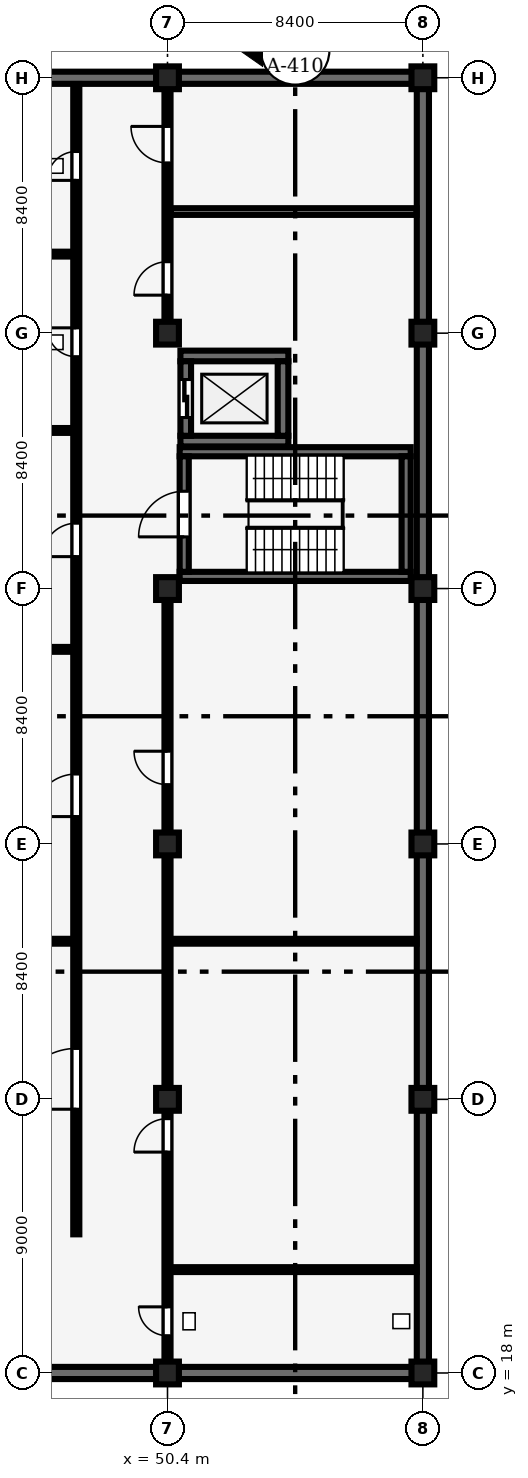
"""IFC4 building model, lengths in metres.
Left out: names, types, materials, properties, quantities, classifications, styles, units other than length and angle.
Written with IfcOpenShell. Run it as: python <this file> out.ifc"""

import sys

from ifc_helpers import new_model, si_unit, direction, frame, frame_2d, origin, origin_2d, place, context, subcontext, project, spatial, rectangle, extrude, element, fill, save


model = new_model("IFC4")
c1 = context("Model", 3, precision=1e-05, world=origin(), true_north=direction((0.0, 1.0)))
c2 = subcontext(c1, "Body", "Model", "MODEL_VIEW")
j1 = project(units=[si_unit("LENGTHUNIT", "METRE"), si_unit("PLANEANGLEUNIT", "RADIAN")], contexts=[c1])
p1 = place(None, origin())
s1 = spatial("IfcSite", under=j1, at=p1, CompositionType="ELEMENT")
p2 = place(p1, origin())
s2 = spatial("IfcBuilding", under=s1, at=p2, CompositionType="ELEMENT")
p3 = place(p2, frame((0.0, 0.0, -4.2)))
s3 = spatial("IfcBuildingStorey", under=s2, at=p3, CompositionType="ELEMENT", Elevation=-4.2)
for number, where, z_axis, x_axis in (
    (1, (50.4, 18.0, 0.0), (0.0, 0.0, 1.0), (1.0, 0.0, 0.0)),
    (2, (50.4, 27.0, 0.0), (0.0, 0.0, 1.0), (1.0, 0.0, 0.0)),
    (3, (50.4, 35.4, 0.0), (0.0, 0.0, 1.0), (1.0, 0.0, 0.0)),
    (4, (50.4, 43.8, 0.0), (0.0, 0.0, 1.0), (1.0, 0.0, 0.0)),
    (5, (50.4, 52.2, 0.0), (0.0, 0.0, 1.0), (1.0, 0.0, 0.0)),
    (6, (50.4, 60.6, 0.0), (0.0, 0.0, 1.0), (1.0, 0.0, 0.0)),
    (7, (58.8, 18.0, 0.0), (0.0, 0.0, 1.0), (1.0, 0.0, 0.0)),
    (8, (58.8, 27.0, 0.0), (0.0, 0.0, 1.0), (1.0, 0.0, 0.0)),
    (9, (58.8, 35.4, 0.0), (0.0, 0.0, 1.0), (1.0, 0.0, 0.0)),
    (10, (58.8, 43.8, 0.0), (0.0, 0.0, 1.0), (1.0, 0.0, 0.0)),
    (11, (58.8, 52.2, 0.0), (0.0, 0.0, 1.0), (1.0, 0.0, 0.0)),
    (12, (58.8, 60.6, 0.0), (0.0, 0.0, 1.0), (1.0, 0.0, 0.0)),
):
    element("IfcColumn", number, at=place(p3, frame(where, z_axis=z_axis, x_axis=x_axis)), inside=s3, PredefinedType="COLUMN", context=c2, shape_type="SweptSolid", body=[
        extrude(rectangle(XDim=0.75, YDim=0.75, at=origin_2d()), origin(), (0.0, 0.0, 1.0), 4.2),
    ])
p4 = place(p3, frame((42.35, 18.0, 0.0), z_axis=(0.0, 0.0, 1.0), x_axis=(1.0, 0.0, 0.0)))
e13 = element("IfcWall", 13, at=p4, inside=s3, PredefinedType="SHEAR", context=c2, shape_type="SweptSolid", body=[
    extrude(rectangle(XDim=7.7, YDim=0.4, at=frame_2d((3.85, 0.0))), origin(), (0.0, 0.0, 1.0), 2.95),
])
p5 = place(p3, frame((50.75, 18.0, 0.0), z_axis=(0.0, 0.0, 1.0), x_axis=(1.0, 0.0, 0.0)))
e14 = element("IfcWall", 14, at=p5, inside=s3, PredefinedType="SHEAR", context=c2, shape_type="SweptSolid", body=[
    extrude(rectangle(XDim=7.7, YDim=0.4, at=frame_2d((3.85, 0.0))), origin(), (0.0, 0.0, 1.0), 2.9),
])
p6 = place(p3, frame((58.8, 18.35, 0.0), z_axis=(0.0, 0.0, 1.0), x_axis=(0.0, 1.0, 0.0)))
e15 = element("IfcWall", 15, at=p6, inside=s3, PredefinedType="SHEAR", context=c2, shape_type="SweptSolid", body=[
    extrude(rectangle(XDim=8.3, YDim=0.4, at=frame_2d((4.15, 0.0))), origin(), (0.0, 0.0, 1.0), 3.05),
])
for number, where, z_axis, x_axis in (
    (16, (58.8, 27.35, 0.0), (0.0, 0.0, 1.0), (0.0, 1.0, 0.0)),
    (17, (58.8, 35.75, 0.0), (0.0, 0.0, 1.0), (0.0, 1.0, 0.0)),
):
    element("IfcWall", number, at=place(p3, frame(where, z_axis=z_axis, x_axis=x_axis)), inside=s3, PredefinedType="SHEAR", context=c2, shape_type="SweptSolid", body=[
        extrude(rectangle(XDim=7.7, YDim=0.4, at=frame_2d((3.85, 0.0))), origin(), (0.0, 0.0, 1.0), 3.0),
    ])
p7 = place(p3, frame((58.8, 44.15, 0.0), z_axis=(0.0, 0.0, 1.0), x_axis=(0.0, 1.0, 0.0)))
e18 = element("IfcWall", 18, at=p7, inside=s3, PredefinedType="SHEAR", context=c2, shape_type="SweptSolid", body=[
    extrude(rectangle(XDim=7.7, YDim=0.4, at=frame_2d((3.85, 0.0))), origin(), (0.0, 0.0, 1.0), 2.95),
])
p8 = place(p3, frame((58.8, 52.55, 0.0), z_axis=(0.0, 0.0, 1.0), x_axis=(0.0, 1.0, 0.0)))
e19 = element("IfcWall", 19, at=p8, inside=s3, PredefinedType="SHEAR", context=c2, shape_type="SweptSolid", body=[
    extrude(rectangle(XDim=7.7, YDim=0.4, at=frame_2d((3.85, 0.0))), origin(), (0.0, 0.0, 1.0), 2.9),
])
p9 = place(p3, frame((42.35, 60.6, 0.0), z_axis=(0.0, 0.0, 1.0), x_axis=(1.0, 0.0, 0.0)))
e20 = element("IfcWall", 20, at=p9, inside=s3, PredefinedType="SHEAR", context=c2, shape_type="SweptSolid", body=[
    extrude(rectangle(XDim=7.7, YDim=0.4, at=frame_2d((3.85, 0.0))), origin(), (0.0, 0.0, 1.0), 3.15),
])
p10 = place(p3, frame((50.75, 60.6, 0.0), z_axis=(0.0, 0.0, 1.0), x_axis=(1.0, 0.0, 0.0)))
e21 = element("IfcWall", 21, at=p10, inside=s3, PredefinedType="SHEAR", context=c2, shape_type="SweptSolid", body=[
    extrude(rectangle(XDim=7.7, YDim=0.4, at=frame_2d((3.85, 0.0))), origin(), (0.0, 0.0, 1.0), 3.1),
])
for number, where, z_axis, x_axis in (
    (22, (50.8, 44.2, 0.0), (0.0, 0.0, 1.0), (1.0, 0.0, 0.0)),
    (23, (50.8, 48.3, 0.0), (0.0, 0.0, 1.0), (1.0, 0.0, 0.0)),
):
    element("IfcWall", number, at=place(p3, frame(where, z_axis=z_axis, x_axis=x_axis)), inside=s3, PredefinedType="SHEAR", context=c2, shape_type="SweptSolid", body=[
        extrude(rectangle(XDim=7.6, YDim=0.3, at=frame_2d((3.8, 0.0))), origin(), (0.0, 0.0, 1.0), 4.025),
    ])
p11 = place(p3, frame((50.95, 44.35, 0.0), z_axis=(0.0, 0.0, 1.0), x_axis=(0.0, 1.0, 0.0)))
e24 = element("IfcWall", 24, at=p11, inside=s3, PredefinedType="SHEAR", context=c2, shape_type="SweptSolid", body=[
    extrude(rectangle(XDim=3.8, YDim=0.3, at=frame_2d((1.9, 0.0))), origin(), (0.0, 0.0, 1.0), 4.025),
])
p12 = place(p11, frame((1.15, 0.0, 0.0)))
e25 = element("IfcOpeningElement", 25, at=p12, cuts=e24, PredefinedType="OPENING", context=c2, shape_type="SweptSolid", body=[
    extrude(rectangle(XDim=1.5, YDim=2.2, at=frame_2d((0.75, 1.1))), frame((0.0, 0.16, 0.0), z_axis=(0.0, -1.0, 0.0), x_axis=(1.0, 0.0, 0.0)), (0.0, 0.0, 1.0), 0.32),
])
p13 = place(p3, frame((58.25, 44.35, 0.0), z_axis=(0.0, 0.0, 1.0), x_axis=(0.0, 1.0, 0.0)))
e26 = element("IfcWall", 26, at=p13, inside=s3, PredefinedType="SHEAR", context=c2, shape_type="SweptSolid", body=[
    extrude(rectangle(XDim=3.8, YDim=0.3, at=frame_2d((1.9, 0.0))), origin(), (0.0, 0.0, 1.0), 4.025),
])
for number, where, z_axis, x_axis in (
    (27, (50.825, 48.65, 0.0), (0.0, 0.0, 1.0), (1.0, 0.0, 0.0)),
    (28, (50.825, 51.45, 0.0), (0.0, 0.0, 1.0), (1.0, 0.0, 0.0)),
):
    element("IfcWall", number, at=place(p3, frame(where, z_axis=z_axis, x_axis=x_axis)), inside=s3, PredefinedType="SHEAR", context=c2, shape_type="SweptSolid", body=[
        extrude(rectangle(XDim=3.55, YDim=0.35, at=frame_2d((1.775, 0.0))), origin(), (0.0, 0.0, 1.0), 3.92),
    ])
p14 = place(p3, frame((51.0, 48.825, 0.0), z_axis=(0.0, 0.0, 1.0), x_axis=(0.0, 1.0, 0.0)))
e29 = element("IfcWall", 29, at=p14, inside=s3, PredefinedType="SHEAR", context=c2, shape_type="SweptSolid", body=[
    extrude(rectangle(XDim=2.45, YDim=0.35, at=frame_2d((1.225, 0.0))), origin(), (0.0, 0.0, 1.0), 3.92),
])
p15 = place(p14, frame((0.6, 0.0, 0.0)))
e30 = element("IfcOpeningElement", 30, at=p15, cuts=e29, PredefinedType="OPENING", context=c2, shape_type="SweptSolid", body=[
    extrude(rectangle(XDim=1.25, YDim=2.25, at=frame_2d((0.625, 1.125))), frame((0.0, 0.185, 0.0), z_axis=(0.0, -1.0, 0.0), x_axis=(1.0, 0.0, 0.0)), (0.0, 0.0, 1.0), 0.37),
])
p16 = place(p3, frame((54.2, 48.825, 0.0), z_axis=(0.0, 0.0, 1.0), x_axis=(0.0, 1.0, 0.0)))
e31 = element("IfcWall", 31, at=p16, inside=s3, PredefinedType="SHEAR", context=c2, shape_type="SweptSolid", body=[
    extrude(rectangle(XDim=2.45, YDim=0.35, at=frame_2d((1.225, 0.0))), origin(), (0.0, 0.0, 1.0), 3.92),
])
for number, where, z_axis, x_axis in (
    (32, (33.805, 32.2, 0.0), (0.0, 0.0, 1.0), (1.0, 0.0, 0.0)),
    (33, (33.805, 41.8, 0.0), (0.0, 0.0, 1.0), (1.0, 0.0, 0.0)),
    (34, (33.805, 49.0, 0.0), (0.0, 0.0, 1.0), (1.0, 0.0, 0.0)),
    (35, (33.805, 54.8, 0.0), (0.0, 0.0, 1.0), (1.0, 0.0, 0.0)),
):
    element("IfcWall", number, at=place(p3, frame(where, z_axis=z_axis, x_axis=x_axis)), inside=s3, PredefinedType="PARTITIONING", context=c2, shape_type="SweptSolid", body=[
        extrude(rectangle(XDim=13.49, YDim=0.16, at=frame_2d((6.745, 0.0))), origin(), (0.0, 0.0, 1.0), 3.9),
    ])
p17 = place(p3, frame((47.4, 22.56, 0.0), z_axis=(0.0, 0.0, 1.0), x_axis=(0.0, 1.0, 0.0)))
e36 = element("IfcWall", 36, at=p17, inside=s3, PredefinedType="PARTITIONING", context=c2, shape_type="SweptSolid", body=[
    extrude(rectangle(XDim=37.835, YDim=0.2, at=frame_2d((18.917, 0.0))), origin(), (0.0, 0.0, 1.0), 3.9),
])
p18 = place(p17, frame((4.115, 0.0, 0.0)))
e37 = element("IfcOpeningElement", 37, at=p18, cuts=e36, PredefinedType="OPENING", context=c2, shape_type="SweptSolid", body=[
    extrude(rectangle(XDim=2.0, YDim=2.5, at=frame_2d((1.0, 1.25))), frame((0.0, 0.11, 0.0), z_axis=(0.0, -1.0, 0.0), x_axis=(1.0, 0.0, 0.0)), (0.0, 0.0, 1.0), 0.22),
])
p19 = place(p17, frame((13.74, 0.0, 0.0)))
e38 = element("IfcOpeningElement", 38, at=p19, cuts=e36, PredefinedType="OPENING", context=c2, shape_type="SweptSolid", body=[
    extrude(rectangle(XDim=1.4, YDim=2.2, at=frame_2d((0.7, 1.1))), frame((0.0, 0.11, 0.0), z_axis=(0.0, -1.0, 0.0), x_axis=(1.0, 0.0, 0.0)), (0.0, 0.0, 1.0), 0.22),
])
p20 = place(p17, frame((22.29, 0.0, 0.0)))
e39 = element("IfcOpeningElement", 39, at=p20, cuts=e36, PredefinedType="OPENING", context=c2, shape_type="SweptSolid", body=[
    extrude(rectangle(XDim=1.1, YDim=2.15, at=frame_2d((0.55, 1.075))), frame((0.0, 0.11, 0.0), z_axis=(0.0, -1.0, 0.0), x_axis=(1.0, 0.0, 0.0)), (0.0, 0.0, 1.0), 0.22),
])
p21 = place(p17, frame((28.865, 0.0, 0.0)))
e40 = element("IfcOpeningElement", 40, at=p21, cuts=e36, PredefinedType="OPENING", context=c2, shape_type="SweptSolid", body=[
    extrude(rectangle(XDim=0.95, YDim=2.2, at=frame_2d((0.475, 1.1))), frame((0.0, 0.11, 0.0), z_axis=(0.0, -1.0, 0.0), x_axis=(1.0, 0.0, 0.0)), (0.0, 0.0, 1.0), 0.22),
])
p22 = place(p17, frame((34.665, 0.0, 0.0)))
e41 = element("IfcOpeningElement", 41, at=p22, cuts=e36, PredefinedType="OPENING", context=c2, shape_type="SweptSolid", body=[
    extrude(rectangle(XDim=0.95, YDim=2.2, at=frame_2d((0.475, 1.1))), frame((0.0, 0.11, 0.0), z_axis=(0.0, -1.0, 0.0), x_axis=(1.0, 0.0, 0.0)), (0.0, 0.0, 1.0), 0.22),
])
for number, where, z_axis, x_axis in (
    (42, (50.505, 21.4, 0.0), (0.0, 0.0, 1.0), (1.0, 0.0, 0.0)),
    (43, (50.505, 32.2, 0.0), (0.0, 0.0, 1.0), (1.0, 0.0, 0.0)),
):
    element("IfcWall", number, at=place(p3, frame(where, z_axis=z_axis, x_axis=x_axis)), inside=s3, PredefinedType="PARTITIONING", context=c2, shape_type="SweptSolid", body=[
        extrude(rectangle(XDim=8.09, YDim=0.16, at=frame_2d((4.045, 0.0))), origin(), (0.0, 0.0, 1.0), 3.9),
    ])
p23 = place(p3, frame((50.4, 18.205, 0.0), z_axis=(0.0, 0.0, 1.0), x_axis=(0.0, 1.0, 0.0)))
e44 = element("IfcWall", 44, at=p23, inside=s3, PredefinedType="PARTITIONING", context=c2, shape_type="SweptSolid", body=[
    extrude(rectangle(XDim=8.41, YDim=0.2, at=frame_2d((4.205, 0.0))), origin(), (0.0, 0.0, 1.0), 2.8),
])
p24 = place(p23, frame((1.02, 0.0, 0.0)))
e45 = element("IfcOpeningElement", 45, at=p24, cuts=e44, PredefinedType="OPENING", context=c2, shape_type="SweptSolid", body=[
    extrude(rectangle(XDim=0.95, YDim=2.1, at=frame_2d((0.475, 1.05))), frame((0.0, 0.11, 0.0), z_axis=(0.0, -1.0, 0.0), x_axis=(1.0, 0.0, 0.0)), (0.0, 0.0, 1.0), 0.22),
])
p25 = place(p23, frame((7.06, 0.0, 0.0)))
e46 = element("IfcOpeningElement", 46, at=p25, cuts=e44, PredefinedType="OPENING", context=c2, shape_type="SweptSolid", body=[
    extrude(rectangle(XDim=1.1, YDim=2.15, at=frame_2d((0.55, 1.075))), frame((0.0, 0.11, 0.0), z_axis=(0.0, -1.0, 0.0), x_axis=(1.0, 0.0, 0.0)), (0.0, 0.0, 1.0), 0.22),
])
p26 = place(p3, frame((50.4, 27.385, 0.0), z_axis=(0.0, 0.0, 1.0), x_axis=(0.0, 1.0, 0.0)))
e47 = element("IfcWall", 47, at=p26, inside=s3, PredefinedType="PARTITIONING", context=c2, shape_type="SweptSolid", body=[
    extrude(rectangle(XDim=7.63, YDim=0.2, at=frame_2d((3.815, 0.0))), origin(), (0.0, 0.0, 1.0), 2.7),
])
p27 = place(p3, frame((50.4, 35.785, 0.0), z_axis=(0.0, 0.0, 1.0), x_axis=(0.0, 1.0, 0.0)))
e48 = element("IfcWall", 48, at=p27, inside=s3, PredefinedType="PARTITIONING", context=c2, shape_type="SweptSolid", body=[
    extrude(rectangle(XDim=7.805, YDim=0.2, at=frame_2d((3.903, 0.0))), origin(), (0.0, 0.0, 1.0), 3.25),
])
p28 = place(p27, frame((1.565, 0.0, 0.0)))
e49 = element("IfcOpeningElement", 49, at=p28, cuts=e48, PredefinedType="OPENING", context=c2, shape_type="SweptSolid", body=[
    extrude(rectangle(XDim=1.1, YDim=2.3, at=frame_2d((0.55, 1.15))), frame((0.0, 0.11, 0.0), z_axis=(0.0, -1.0, 0.0), x_axis=(1.0, 0.0, 0.0)), (0.0, 0.0, 1.0), 0.22),
])
p29 = place(p3, frame((50.505, 56.2, 0.0), z_axis=(0.0, 0.0, 1.0), x_axis=(1.0, 0.0, 0.0)))
e50 = element("IfcWall", 50, at=p29, inside=s3, PredefinedType="SOLIDWALL", context=c2, shape_type="SweptSolid", body=[
    extrude(rectangle(XDim=8.09, YDim=0.22, at=frame_2d((4.045, 0.0))), origin(), (0.0, 0.0, 1.0), 3.9),
])
p30 = place(p3, frame((50.4, 52.585, 0.0), z_axis=(0.0, 0.0, 1.0), x_axis=(0.0, 1.0, 0.0)))
e51 = element("IfcWall", 51, at=p30, inside=s3, PredefinedType="PARTITIONING", context=c2, shape_type="SweptSolid", body=[
    extrude(rectangle(XDim=7.81, YDim=0.2, at=frame_2d((3.905, 0.0))), origin(), (0.0, 0.0, 1.0), 3.2),
])
p31 = place(p30, frame((0.865, 0.0, 0.0)))
e52 = element("IfcOpeningElement", 52, at=p31, cuts=e51, PredefinedType="OPENING", context=c2, shape_type="SweptSolid", body=[
    extrude(rectangle(XDim=1.1, YDim=2.15, at=frame_2d((0.55, 1.075))), frame((0.0, 0.11, 0.0), z_axis=(0.0, -1.0, 0.0), x_axis=(1.0, 0.0, 0.0)), (0.0, 0.0, 1.0), 0.22),
])
p32 = place(p30, frame((5.215, 0.0, 0.0)))
e53 = element("IfcOpeningElement", 53, at=p32, cuts=e51, PredefinedType="OPENING", context=c2, shape_type="SweptSolid", body=[
    extrude(rectangle(XDim=1.2, YDim=2.4, at=frame_2d((0.6, 1.2))), frame((0.0, 0.11, 0.0), z_axis=(0.0, -1.0, 0.0), x_axis=(1.0, 0.0, 0.0)), (0.0, 0.0, 1.0), 0.22),
])
p33 = place(p12, origin())
e54 = element("IfcDoor", 54, at=p33, inside=s3, OperationType="DOUBLE_DOOR_SINGLE_SWING", PredefinedType="DOOR", context=c2, shape_type="SweptSolid", body=[
    extrude(rectangle(XDim=1.5, YDim=2.2, at=frame_2d((0.75, 1.1))), frame((0.0, 0.025, 0.0), z_axis=(0.0, -1.0, 0.0), x_axis=(1.0, 0.0, 0.0)), (0.0, 0.0, 1.0), 0.05),
])
fill(e25, e54)
p34 = place(p15, origin())
e55 = element("IfcDoor", 55, at=p34, inside=s3, OperationType="DOUBLE_DOOR_SLIDING", PredefinedType="DOOR", context=c2, shape_type="SweptSolid", body=[
    extrude(rectangle(XDim=1.25, YDim=2.25, at=frame_2d((0.625, 1.125))), frame((0.0, 0.025, 0.0), z_axis=(0.0, -1.0, 0.0), x_axis=(1.0, 0.0, 0.0)), (0.0, 0.0, 1.0), 0.05),
])
fill(e30, e55)
p35 = place(p18, origin())
e56 = element("IfcDoor", 56, at=p35, inside=s3, OperationType="DOUBLE_DOOR_SINGLE_SWING", PredefinedType="DOOR", context=c2, shape_type="SweptSolid", body=[
    extrude(rectangle(XDim=2.0, YDim=2.5, at=frame_2d((1.0, 1.25))), frame((0.0, 0.025, 0.0), z_axis=(0.0, -1.0, 0.0), x_axis=(1.0, 0.0, 0.0)), (0.0, 0.0, 1.0), 0.05),
])
fill(e37, e56)
p36 = place(p19, origin())
e57 = element("IfcDoor", 57, at=p36, inside=s3, OperationType="DOUBLE_DOOR_SINGLE_SWING", PredefinedType="DOOR", context=c2, shape_type="SweptSolid", body=[
    extrude(rectangle(XDim=1.4, YDim=2.2, at=frame_2d((0.7, 1.1))), frame((0.0, 0.025, 0.0), z_axis=(0.0, -1.0, 0.0), x_axis=(1.0, 0.0, 0.0)), (0.0, 0.0, 1.0), 0.05),
])
fill(e38, e57)
p37 = place(p20, origin())
e58 = element("IfcDoor", 58, at=p37, inside=s3, OperationType="SINGLE_SWING_LEFT", PredefinedType="DOOR", context=c2, shape_type="SweptSolid", body=[
    extrude(rectangle(XDim=1.1, YDim=2.15, at=frame_2d((0.55, 1.075))), frame((0.0, 0.025, 0.0), z_axis=(0.0, -1.0, 0.0), x_axis=(1.0, 0.0, 0.0)), (0.0, 0.0, 1.0), 0.05),
])
fill(e39, e58)
p38 = place(p21, origin())
e59 = element("IfcDoor", 59, at=p38, inside=s3, OperationType="SINGLE_SWING_RIGHT", PredefinedType="DOOR", context=c2, shape_type="SweptSolid", body=[
    extrude(rectangle(XDim=0.95, YDim=2.2, at=frame_2d((0.475, 1.1))), frame((0.0, 0.025, 0.0), z_axis=(0.0, -1.0, 0.0), x_axis=(1.0, 0.0, 0.0)), (0.0, 0.0, 1.0), 0.05),
])
fill(e40, e59)
p39 = place(p22, origin())
e60 = element("IfcDoor", 60, at=p39, inside=s3, OperationType="SINGLE_SWING_LEFT", PredefinedType="DOOR", context=c2, shape_type="SweptSolid", body=[
    extrude(rectangle(XDim=0.95, YDim=2.2, at=frame_2d((0.475, 1.1))), frame((0.0, 0.025, 0.0), z_axis=(0.0, -1.0, 0.0), x_axis=(1.0, 0.0, 0.0)), (0.0, 0.0, 1.0), 0.05),
])
fill(e41, e60)
p40 = place(p24, origin())
e61 = element("IfcDoor", 61, at=p40, inside=s3, OperationType="SINGLE_SWING_RIGHT", PredefinedType="DOOR", context=c2, shape_type="SweptSolid", body=[
    extrude(rectangle(XDim=0.95, YDim=2.1, at=frame_2d((0.475, 1.05))), frame((0.0, 0.025, 0.0), z_axis=(0.0, -1.0, 0.0), x_axis=(1.0, 0.0, 0.0)), (0.0, 0.0, 1.0), 0.05),
])
fill(e45, e61)
p41 = place(p25, origin())
e62 = element("IfcDoor", 62, at=p41, inside=s3, OperationType="SINGLE_SWING_LEFT", PredefinedType="DOOR", context=c2, shape_type="SweptSolid", body=[
    extrude(rectangle(XDim=1.1, YDim=2.15, at=frame_2d((0.55, 1.075))), frame((0.0, 0.025, 0.0), z_axis=(0.0, -1.0, 0.0), x_axis=(1.0, 0.0, 0.0)), (0.0, 0.0, 1.0), 0.05),
])
fill(e46, e62)
p42 = place(p28, origin())
e63 = element("IfcDoor", 63, at=p42, inside=s3, OperationType="SINGLE_SWING_RIGHT", PredefinedType="DOOR", context=c2, shape_type="SweptSolid", body=[
    extrude(rectangle(XDim=1.1, YDim=2.3, at=frame_2d((0.55, 1.15))), frame((0.0, 0.025, 0.0), z_axis=(0.0, -1.0, 0.0), x_axis=(1.0, 0.0, 0.0)), (0.0, 0.0, 1.0), 0.05),
])
fill(e49, e63)
p43 = place(p31, origin())
e64 = element("IfcDoor", 64, at=p43, inside=s3, OperationType="SINGLE_SWING_LEFT", PredefinedType="DOOR", context=c2, shape_type="SweptSolid", body=[
    extrude(rectangle(XDim=1.1, YDim=2.15, at=frame_2d((0.55, 1.075))), frame((0.0, 0.025, 0.0), z_axis=(0.0, -1.0, 0.0), x_axis=(1.0, 0.0, 0.0)), (0.0, 0.0, 1.0), 0.05),
])
fill(e52, e64)
p44 = place(p32, origin())
e65 = element("IfcDoor", 65, at=p44, inside=s3, OperationType="SINGLE_SWING_RIGHT", PredefinedType="DOOR", context=c2, shape_type="SweptSolid", body=[
    extrude(rectangle(XDim=1.2, YDim=2.4, at=frame_2d((0.6, 1.2))), frame((0.0, 0.025, 0.0), z_axis=(0.0, -1.0, 0.0), x_axis=(1.0, 0.0, 0.0)), (0.0, 0.0, 1.0), 0.05),
])
fill(e53, e65)
save(model, sys.argv[1])
